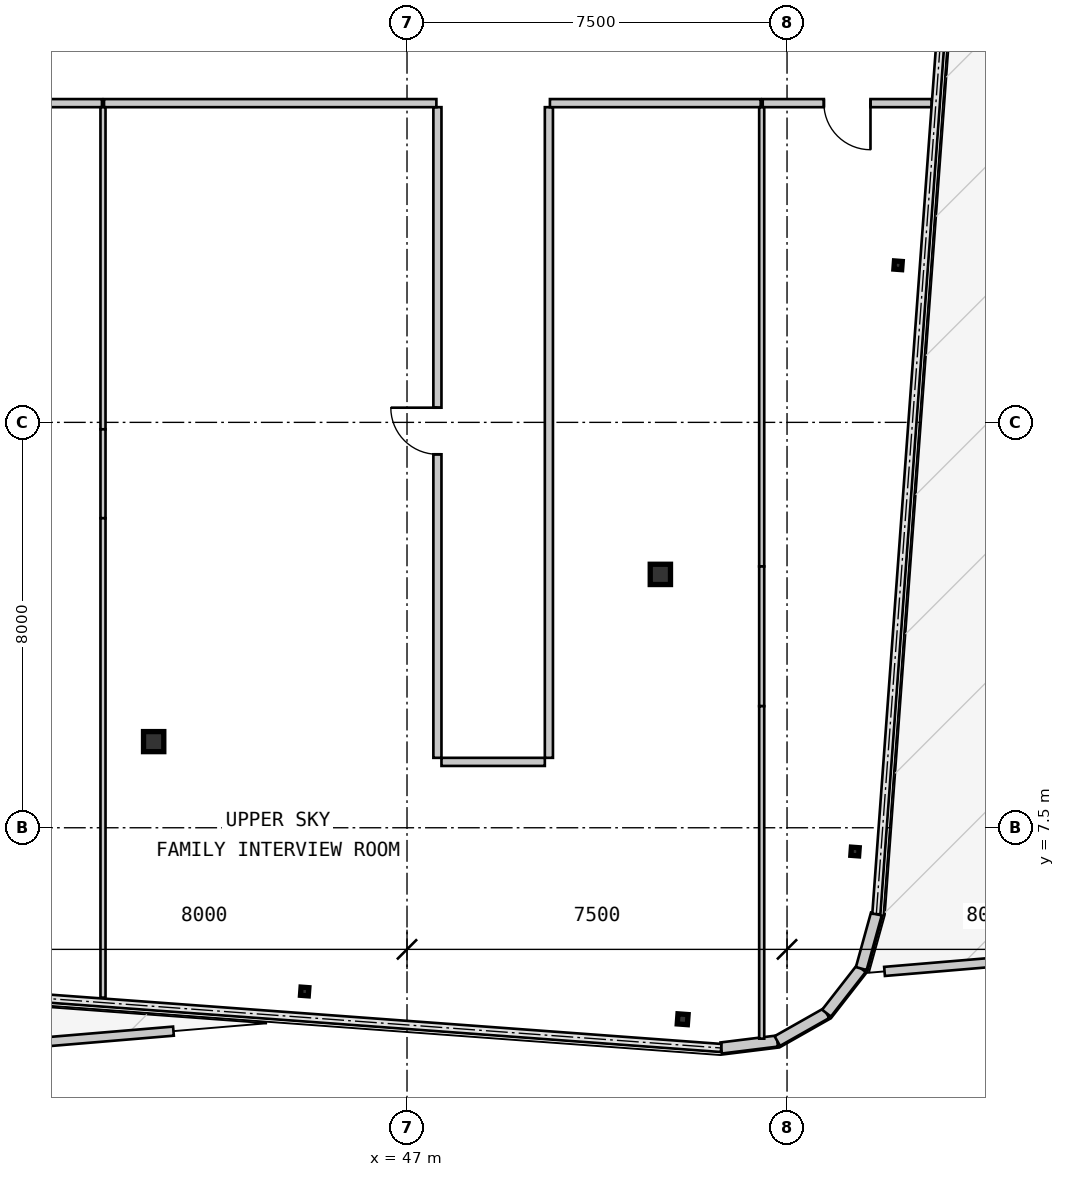
"""IFC4 building model, lengths in metres.
Left out: names, types, materials, properties, quantities, classifications, styles, units other than length and angle.
Written with IfcOpenShell. Run it as: python <this file> out.ifc"""

import sys

from ifc_helpers import new_model, si_unit, direction, frame, frame_2d, origin, origin_2d, place, context, subcontext, project, spatial, rectangle, hollow_rectangle, i_section, extrude, source, transform, mapped, element, fill, save


model = new_model("IFC4")
c1 = context("Model", 3, precision=1e-05, world=origin(), true_north=direction((0.0, 1.0)))
c2 = subcontext(c1, "Body", "Model", "MODEL_VIEW")
j1 = project(units=[si_unit("LENGTHUNIT", "METRE"), si_unit("PLANEANGLEUNIT", "RADIAN")], contexts=[c1])
p1 = place(None, origin())
s1 = spatial("IfcSite", under=j1, at=p1, CompositionType="ELEMENT")
p2 = place(p1, origin())
s2 = spatial("IfcBuilding", under=s1, at=p2, CompositionType="ELEMENT")
p3 = place(p2, frame((0.0, 0.0, 211.4)))
s3 = spatial("IfcBuildingStorey", under=s2, at=p3, CompositionType="ELEMENT", Elevation=211.4)
m1 = source(origin(), c2, "Body", "SweptSolid", [
    extrude(i_section(OverallWidth=0.4, OverallDepth=0.396, WebThickness=0.022, FlangeThickness=0.034, at=origin_2d()), origin(), (0.0, 0.0, 1.0), 3.15),
])
p4 = place(p3, frame((42.0, 9.2, 0.0), z_axis=(0.0, 0.0, 1.0), x_axis=(1.0, 0.0, 0.0)))
e1 = element("IfcColumn", 1, at=p4, inside=s3, PredefinedType="COLUMN", context=c2, shape_type="MappedRepresentation", body=[
    mapped(m1, transform((0.0, 0.0, 0.0), scale=1.0)),
])
m2 = source(origin(), c2, "Body", "SweptSolid", [
    extrude(hollow_rectangle(XDim=0.4, YDim=0.4, WallThickness=0.016, at=origin_2d()), origin(), (0.0, 0.0, 1.0), 3.15),
])
p5 = place(p3, frame((52.0, 12.5, 0.0), z_axis=(0.0, 0.0, 1.0), x_axis=(1.0, 0.0, 0.0)))
e2 = element("IfcColumn", 2, at=p5, inside=s3, PredefinedType="COLUMN", context=c2, shape_type="MappedRepresentation", body=[
    mapped(m2, transform((0.0, 0.0, 0.0), scale=1.0)),
])
m3 = source(origin(), c2, "Body", "SweptSolid", [
    extrude(i_section(OverallWidth=0.154, OverallDepth=0.162, WebThickness=0.008, FlangeThickness=0.011, at=origin_2d()), origin(), (0.0, 0.0, 1.0), 3.15),
])
p6 = place(p3, frame((44.98, 4.269, 0.0), z_axis=(0.0, 0.0, 1.0), x_axis=(0.997314477224, -0.073238197128, 0.0)))
e3 = element("IfcColumn", 3, at=p6, inside=s3, PredefinedType="COLUMN", context=c2, shape_type="MappedRepresentation", body=[
    mapped(m3, transform((0.0, 0.0, 0.0), scale=1.0)),
])
m4 = source(origin(), c2, "Body", "SweptSolid", [
    extrude(hollow_rectangle(XDim=0.2, YDim=0.2, WallThickness=0.009, at=origin_2d()), origin(), (0.0, 0.0, 1.0), 3.15),
])
p7 = place(p3, frame((52.44, 3.721, 0.0), z_axis=(0.0, 0.0, 1.0), x_axis=(0.997314477224, -0.073238197128, 0.0)))
e4 = element("IfcColumn", 4, at=p7, inside=s3, PredefinedType="COLUMN", context=c2, shape_type="MappedRepresentation", body=[
    mapped(m4, transform((0.0, 0.0, 0.0), scale=1.0)),
])
for number, where, z_axis, x_axis in (
    (5, (55.842, 7.031, 0.0), (0.0, 0.0, 1.0), (0.997, -0.073, 0.0)),
    (6, (56.691, 18.6, 0.0), (0.0, 0.0, 1.0), (0.997, -0.073, 0.0)),
):
    element("IfcColumn", number, at=place(p3, frame(where, z_axis=z_axis, x_axis=x_axis)), inside=s3, PredefinedType="COLUMN", context=c2, shape_type="MappedRepresentation", body=[
        mapped(m3, transform((0.0, 0.0, 0.0), scale=1.0)),
    ])
m5 = source(origin(), c2, "Body", "SweptSolid", [
    extrude(rectangle(XDim=1.116, YDim=0.22, at=frame_2d((0.558, 0.0))), origin(), (0.0, 0.0, 1.0), 2.93),
])
p8 = place(p3, frame((53.201, 3.154, 0.0), z_axis=(0.0, 0.0, 1.0), x_axis=(0.992438604032, 0.122742076028, 0.0)))
e7 = element("IfcWall", 7, at=p8, inside=s3, PredefinedType="SOLIDWALL", context=c2, shape_type="MappedRepresentation", body=[
    mapped(m5, transform((0.0, 0.0, 0.0), scale=1.0)),
])
m6 = source(origin(), c2, "Body", "SweptSolid", [
    extrude(rectangle(XDim=1.116, YDim=0.22, at=frame_2d((0.558, 0.0))), origin(), (0.0, 0.0, 1.0), 2.93),
])
p9 = place(p3, frame((54.308, 3.291, 0.0), z_axis=(0.0, 0.0, 1.0), x_axis=(0.869893934693, 0.49323882895, 0.0)))
e8 = element("IfcWall", 8, at=p9, inside=s3, PredefinedType="SOLIDWALL", context=c2, shape_type="MappedRepresentation", body=[
    mapped(m6, transform((0.0, 0.0, 0.0), scale=1.0)),
])
for number, where, z_axis, x_axis in (
    (9, (55.279, 3.841, 0.0), (0.0, 0.0, 1.0), (0.615, 0.789, 0.0)),
    (10, (55.965, 4.721, 0.0), (0.0, 0.0, 1.0), (0.266, 0.964, 0.0)),
):
    element("IfcWall", number, at=place(p3, frame(where, z_axis=z_axis, x_axis=x_axis)), inside=s3, PredefinedType="SOLIDWALL", context=c2, shape_type="MappedRepresentation", body=[
        mapped(m5, transform((0.0, 0.0, 0.0), scale=1.0)),
    ])
m7 = source(origin(), c2, "Body", "SweptSolid", [
    extrude(rectangle(XDim=3.235, YDim=0.18, at=frame_2d((1.617, 0.0))), origin(), (0.0, 0.0, 1.0), 1.15),
])
p10 = place(p3, frame((59.648, 4.936, 0.0), z_axis=(0.0, 0.0, 1.0), x_axis=(-0.996491417133, -0.083695015268, 0.0)))
e11 = element("IfcWall", 11, at=p10, inside=s3, PredefinedType="PARAPET", context=c2, shape_type="MappedRepresentation", body=[
    mapped(m7, transform((0.0, 0.0, 0.0), scale=1.0)),
])
m8 = source(origin(), c2, "Body", "SweptSolid", [
    extrude(rectangle(XDim=25.182, YDim=0.18, at=frame_2d((12.591, 0.0))), origin(), (0.0, 0.0, 1.0), 1.15),
])
p11 = place(p3, frame((42.39, 3.487, 0.0), z_axis=(0.0, 0.0, 1.0), x_axis=(-0.996492802382, -0.083678520547, 0.0)))
e12 = element("IfcWall", 12, at=p11, inside=s3, PredefinedType="PARAPET", context=c2, shape_type="MappedRepresentation", body=[
    mapped(m8, transform((0.0, 0.0, 0.0), scale=1.0)),
])
m9 = source(origin(), c2, "Body", "SweptSolid", [
    extrude(rectangle(XDim=11.959, YDim=0.16, at=frame_2d((5.98, 0.0))), origin(), (0.0, 0.0, 1.0), 2.93),
])
p12 = place(p3, frame((40.98, 21.8, 0.0), z_axis=(0.0, 0.0, 1.0), x_axis=(-1.0, 0.0, 0.0)))
e13 = element("IfcWall", 13, at=p12, inside=s3, PredefinedType="PARTITIONING", context=c2, shape_type="MappedRepresentation", body=[
    mapped(m9, transform((0.0, 0.0, 0.0), scale=1.0)),
])
m10 = source(origin(), c2, "Body", "SweptSolid", [
    extrude(rectangle(XDim=1.05, YDim=2.1, at=frame_2d((0.525, 1.05))), frame((0.0, 0.09, 0.0), z_axis=(0.0, -1.0, 0.0), x_axis=(1.0, 0.0, 0.0)), (0.0, 0.0, 1.0), 0.18),
])
p13 = place(p12, frame((5.455, 0.0, 0.0)))
e14 = element("IfcOpeningElement", 14, at=p13, cuts=e13, PredefinedType="OPENING", context=c2, shape_type="MappedRepresentation", body=[
    mapped(m10, transform((0.0, 0.0, 0.0), scale=1.0)),
])
m11 = source(origin(), c2, "Body", "SweptSolid", [
    extrude(rectangle(XDim=12.84, YDim=0.16, at=frame_2d((6.42, 0.0))), origin(), (0.0, 0.0, 1.0), 2.93),
])
p14 = place(p3, frame((47.6, 8.88, 0.0), z_axis=(0.0, 0.0, 1.0), x_axis=(0.0, 1.0, 0.0)))
e15 = element("IfcWall", 15, at=p14, inside=s3, PredefinedType="PARTITIONING", context=c2, shape_type="MappedRepresentation", body=[
    mapped(m11, transform((0.0, 0.0, 0.0), scale=1.0)),
])
m12 = source(origin(), c2, "Body", "SweptSolid", [
    extrude(rectangle(XDim=0.92, YDim=2.1, at=frame_2d((0.46, 1.05))), frame((0.0, 0.09, 0.0), z_axis=(0.0, -1.0, 0.0), x_axis=(1.0, 0.0, 0.0)), (0.0, 0.0, 1.0), 0.18),
])
p15 = place(p14, frame((5.99, 0.0, 0.0)))
e16 = element("IfcOpeningElement", 16, at=p15, cuts=e15, PredefinedType="OPENING", context=c2, shape_type="MappedRepresentation", body=[
    mapped(m12, transform((0.0, 0.0, 0.0), scale=1.0)),
])
p16 = place(p3, frame((49.8, 21.72, 0.0), z_axis=(0.0, 0.0, 1.0), x_axis=(0.0, -1.0, 0.0)))
e17 = element("IfcWall", 17, at=p16, inside=s3, PredefinedType="PARTITIONING", context=c2, shape_type="MappedRepresentation", body=[
    mapped(m11, transform((0.0, 0.0, 0.0), scale=1.0)),
])
m13 = source(origin(), c2, "Body", "SweptSolid", [
    extrude(rectangle(XDim=6.559, YDim=0.16, at=frame_2d((3.28, 0.0))), origin(), (0.0, 0.0, 1.0), 2.93),
])
p17 = place(p3, frame((47.58, 21.8, 0.0), z_axis=(0.0, 0.0, 1.0), x_axis=(-1.0, 0.0, 0.0)))
e18 = element("IfcWall", 18, at=p17, inside=s3, PredefinedType="PARTITIONING", context=c2, shape_type="MappedRepresentation", body=[
    mapped(m13, transform((0.0, 0.0, 0.0), scale=1.0)),
])
m14 = source(origin(), c2, "Body", "SweptSolid", [
    extrude(rectangle(XDim=4.159, YDim=0.16, at=frame_2d((2.08, 0.0))), origin(), (0.0, 0.0, 1.0), 2.93),
])
p18 = place(p3, frame((53.98, 21.8, 0.0), z_axis=(0.0, 0.0, 1.0), x_axis=(-1.0, 0.0, 0.0)))
e19 = element("IfcWall", 19, at=p18, inside=s3, PredefinedType="PARTITIONING", context=c2, shape_type="MappedRepresentation", body=[
    mapped(m14, transform((0.0, 0.0, 0.0), scale=1.0)),
])
m15 = source(origin(), c2, "Body", "SweptSolid", [
    extrude(rectangle(XDim=2.04, YDim=0.16, at=frame_2d((1.02, 0.0))), origin(), (0.0, 0.0, 1.0), 2.93),
])
p19 = place(p3, frame((49.72, 8.8, 0.0), z_axis=(0.0, 0.0, 1.0), x_axis=(-1.0, 0.0, 0.0)))
e20 = element("IfcWall", 20, at=p19, inside=s3, PredefinedType="PARTITIONING", context=c2, shape_type="MappedRepresentation", body=[
    mapped(m15, transform((0.0, 0.0, 0.0), scale=1.0)),
])
m16 = source(origin(), c2, "Body", "SweptSolid", [
    extrude(rectangle(XDim=3.333, YDim=0.16, at=frame_2d((1.667, 0.0))), origin(), (0.0, 0.0, 1.0), 2.93),
])
p20 = place(p3, frame((57.353, 21.8, 0.0), z_axis=(0.0, 0.0, 1.0), x_axis=(-1.0, 0.0, 0.0)))
e21 = element("IfcWall", 21, at=p20, inside=s3, PredefinedType="PARTITIONING", context=c2, shape_type="MappedRepresentation", body=[
    mapped(m16, transform((0.0, 0.0, 0.0), scale=1.0)),
])
p21 = place(p20, frame((1.207, 0.0, 0.0)))
e22 = element("IfcOpeningElement", 22, at=p21, cuts=e21, PredefinedType="OPENING", context=c2, shape_type="MappedRepresentation", body=[
    mapped(m12, transform((0.0, 0.0, 0.0), scale=1.0)),
])
m17 = source(origin(), c2, "Body", "SweptSolid", [
    extrude(rectangle(XDim=6.355, YDim=0.1, at=frame_2d((3.177, 0.0))), origin(), (0.0, 0.0, 1.0), 2.93),
])
p22 = place(p3, frame((41.0, 21.718, 0.0), z_axis=(0.0, 0.0, 1.0), x_axis=(0.0, -1.0, 0.0)))
e23 = element("IfcWall", 23, at=p22, inside=s3, PredefinedType="MOVABLE", context=c2, shape_type="MappedRepresentation", body=[
    mapped(m17, transform((0.0, 0.0, 0.0), scale=1.0)),
])
m18 = source(origin(), c2, "Body", "SweptSolid", [
    extrude(rectangle(XDim=1.755, YDim=0.1, at=frame_2d((0.877, 0.0))), origin(), (0.0, 0.0, 1.0), 2.328),
])
p23 = place(p3, frame((41.0, 15.363, 0.0), z_axis=(0.0, 0.0, 1.0), x_axis=(0.0, -1.0, 0.0)))
e24 = element("IfcWall", 24, at=p23, inside=s3, PredefinedType="MOVABLE", context=c2, shape_type="MappedRepresentation", body=[
    mapped(m18, transform((0.0, 0.0, 0.0), scale=1.0)),
])
m19 = source(origin(), c2, "Body", "SweptSolid", [
    extrude(rectangle(XDim=9.46, YDim=0.1, at=frame_2d((4.73, 0.0))), origin(), (0.0, 0.0, 1.0), 2.93),
])
p24 = place(p3, frame((41.0, 13.608, 0.0), z_axis=(0.0, 0.0, 1.0), x_axis=(0.0, -1.0, 0.0)))
e25 = element("IfcWall", 25, at=p24, inside=s3, PredefinedType="MOVABLE", context=c2, shape_type="MappedRepresentation", body=[
    mapped(m19, transform((0.0, 0.0, 0.0), scale=1.0)),
])
m20 = source(origin(), c2, "Body", "SweptSolid", [
    extrude(rectangle(XDim=9.061, YDim=0.1, at=frame_2d((4.531, 0.0))), origin(), (0.0, 0.0, 1.0), 2.93),
])
p25 = place(p3, frame((54.0, 21.718, 0.0), z_axis=(0.0, 0.0, 1.0), x_axis=(0.0, -1.0, 0.0)))
e26 = element("IfcWall", 26, at=p25, inside=s3, PredefinedType="MOVABLE", context=c2, shape_type="MappedRepresentation", body=[
    mapped(m20, transform((0.0, 0.0, 0.0), scale=1.0)),
])
m21 = source(origin(), c2, "Body", "SweptSolid", [
    extrude(rectangle(XDim=2.757, YDim=0.1, at=frame_2d((1.379, 0.0))), origin(), (0.0, 0.0, 1.0), 2.623),
])
p26 = place(p3, frame((54.0, 12.657, 0.0), z_axis=(0.0, 0.0, 1.0), x_axis=(0.0, -1.0, 0.0)))
e27 = element("IfcWall", 27, at=p26, inside=s3, PredefinedType="MOVABLE", context=c2, shape_type="MappedRepresentation", body=[
    mapped(m21, transform((0.0, 0.0, 0.0), scale=1.0)),
])
m22 = source(origin(), c2, "Body", "SweptSolid", [
    extrude(rectangle(XDim=6.562, YDim=0.1, at=frame_2d((3.281, 0.0))), origin(), (0.0, 0.0, 1.0), 2.93),
])
p27 = place(p3, frame((54.0, 9.9, 0.0), z_axis=(0.0, 0.0, 1.0), x_axis=(0.0, -1.0, 0.0)))
e28 = element("IfcWall", 28, at=p27, inside=s3, PredefinedType="MOVABLE", context=c2, shape_type="MappedRepresentation", body=[
    mapped(m22, transform((0.0, 0.0, 0.0), scale=1.0)),
])
m23 = source(origin(), c2, "Body", "SweptSolid", [
    extrude(rectangle(XDim=0.92, YDim=2.1, at=frame_2d((0.46, 1.05))), frame((0.0, 0.025, 0.0), z_axis=(0.0, -1.0, 0.0), x_axis=(1.0, 0.0, 0.0)), (0.0, 0.0, 1.0), 0.05),
])
p28 = place(p15, origin())
e29 = element("IfcDoor", 29, at=p28, inside=s3, OperationType="SINGLE_SWING_RIGHT", PredefinedType="DOOR", context=c2, shape_type="MappedRepresentation", body=[
    mapped(m23, transform((0.0, 0.0, 0.0), scale=1.0)),
])
fill(e16, e29)
p29 = place(p21, origin())
e30 = element("IfcDoor", 30, at=p29, inside=s3, OperationType="SINGLE_SWING_LEFT", PredefinedType="DOOR", context=c2, shape_type="MappedRepresentation", body=[
    mapped(m23, transform((0.0, 0.0, 0.0), scale=1.0)),
])
fill(e22, e30)
save(model, sys.argv[1])
